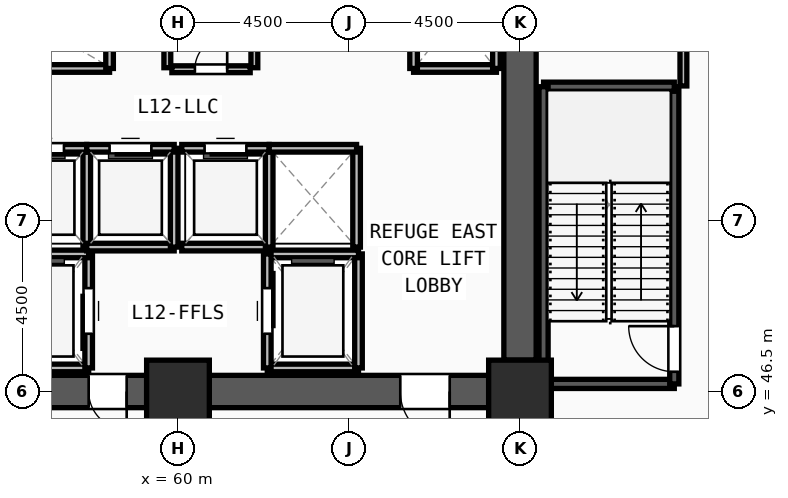
"""IFC4 building model, lengths in metres.
Left out: names, types, materials, properties, quantities, classifications, styles, units other than length and angle.
Written with IfcOpenShell. Run it as: python <this file> out.ifc"""

import sys

from ifc_helpers import new_model, si_unit, direction, frame, frame_2d, origin, origin_2d, place, context, subcontext, project, spatial, rectangle, extrude, source, transform, mapped, element, fill, save


model = new_model("IFC4")
c1 = context("Model", 3, precision=1e-05, world=origin(), true_north=direction((0.0, 1.0)))
c2 = subcontext(c1, "Body", "Model", "MODEL_VIEW")
j1 = project(units=[si_unit("LENGTHUNIT", "METRE"), si_unit("PLANEANGLEUNIT", "RADIAN")], contexts=[c1])
p1 = place(None, origin())
s1 = spatial("IfcSite", under=j1, at=p1, CompositionType="ELEMENT")
p2 = place(p1, origin())
s2 = spatial("IfcBuilding", under=s1, at=p2, CompositionType="ELEMENT")
p3 = place(p2, frame((0.0, 0.0, 47.25)))
s3 = spatial("IfcBuildingStorey", under=s2, at=p3, CompositionType="ELEMENT", Elevation=47.25)
m1 = source(origin(), c2, "Body", "SweptSolid", [
    extrude(rectangle(XDim=1.65, YDim=1.65, at=origin_2d()), origin(), (0.0, 0.0, 1.0), 4.5),
])
for number, where, z_axis, x_axis in (
    (1, (60.0, 46.5, 0.0), (0.0, 0.0, 1.0), (1.0, 0.0, 0.0)),
    (2, (69.0, 46.5, 0.0), (0.0, 0.0, 1.0), (1.0, 0.0, 0.0)),
):
    element("IfcColumn", number, at=place(p3, frame(where, z_axis=z_axis, x_axis=x_axis)), inside=s3, PredefinedType="COLUMN", context=c2, shape_type="MappedRepresentation", body=[
        mapped(m1, transform((0.0, 0.0, 0.0), x_axis=(1.0, 0.0, 0.0), y_axis=(0.0, 1.0, 0.0), z_axis=(0.0, 0.0, 1.0), scale=1.0)),
    ])
p4 = place(p3, frame((69.0, 60.675, 0.0), z_axis=(0.0, 0.0, 1.0), x_axis=(0.0, -1.0, 0.0)))
e3 = element("IfcWall", 3, at=p4, inside=s3, PredefinedType="SHEAR", context=c2, shape_type="SweptSolid", body=[
    extrude(rectangle(XDim=13.35, YDim=0.85, at=frame_2d((6.675, 0.0))), origin(), (0.0, 0.0, 1.0), 4.32),
])
m2 = source(origin(), c2, "Body", "SweptSolid", [
    extrude(rectangle(XDim=1.2, YDim=2.2, at=frame_2d((0.6, 1.1))), frame((0.0, 0.435, 0.0), z_axis=(0.0, -1.0, 0.0), x_axis=(1.0, 0.0, 0.0)), (0.0, 0.0, 1.0), 0.87),
])
p5 = place(p4, frame((1.125, 0.0, 0.0)))
e4 = element("IfcOpeningElement", 4, at=p5, cuts=e3, PredefinedType="OPENING", context=c2, shape_type="MappedRepresentation", body=[
    mapped(m2, transform((0.0, 0.0, 0.0), x_axis=(1.0, 0.0, 0.0), y_axis=(0.0, 1.0, 0.0), z_axis=(0.0, 0.0, 1.0), scale=1.0)),
])
p6 = place(p3, frame((68.175, 46.5, 0.0), z_axis=(0.0, 0.0, 1.0), x_axis=(-1.0, 0.0, 0.0)))
e5 = element("IfcWall", 5, at=p6, inside=s3, PredefinedType="SHEAR", context=c2, shape_type="SweptSolid", body=[
    extrude(rectangle(XDim=7.35, YDim=0.85, at=frame_2d((3.675, 0.0))), origin(), (0.0, 0.0, 1.0), 4.32),
])
m3 = source(origin(), c2, "Body", "SweptSolid", [
    extrude(rectangle(XDim=1.3, YDim=2.2, at=frame_2d((0.65, 1.1))), frame((0.0, 0.435, 0.0), z_axis=(0.0, -1.0, 0.0), x_axis=(1.0, 0.0, 0.0)), (0.0, 0.0, 1.0), 0.87),
])
p7 = place(p6, frame((1.025, 0.0, 0.0)))
e6 = element("IfcOpeningElement", 6, at=p7, cuts=e5, PredefinedType="OPENING", context=c2, shape_type="MappedRepresentation", body=[
    mapped(m3, transform((0.0, 0.0, 0.0), x_axis=(1.0, 0.0, 0.0), y_axis=(0.0, 1.0, 0.0), z_axis=(0.0, 0.0, 1.0), scale=1.0)),
])
p8 = place(p3, frame((59.175, 46.5, 0.0), z_axis=(0.0, 0.0, 1.0), x_axis=(-1.0, 0.0, 0.0)))
e7 = element("IfcWall", 7, at=p8, inside=s3, PredefinedType="SHEAR", context=c2, shape_type="SweptSolid", body=[
    extrude(rectangle(XDim=7.35, YDim=0.85, at=frame_2d((3.675, 0.0))), origin(), (0.0, 0.0, 1.0), 4.32),
])
p9 = place(p8, frame((5.025, 0.0, 0.0)))
e8 = element("IfcOpeningElement", 8, at=p9, cuts=e7, PredefinedType="OPENING", context=c2, shape_type="MappedRepresentation", body=[
    mapped(m3, transform((0.0, 0.0, 0.0), x_axis=(1.0, 0.0, 0.0), y_axis=(0.0, 1.0, 0.0), z_axis=(0.0, 0.0, 1.0), scale=1.0)),
])
m4 = source(origin(), c2, "Body", "SweptSolid", [
    extrude(rectangle(XDim=1.0, YDim=2.2, at=frame_2d((0.5, 1.1))), frame((0.0, 0.435, 0.0), z_axis=(0.0, -1.0, 0.0), x_axis=(1.0, 0.0, 0.0)), (0.0, 0.0, 1.0), 0.87),
])
p10 = place(p8, frame((0.525, 0.0, 0.0)))
e9 = element("IfcOpeningElement", 9, at=p10, cuts=e7, PredefinedType="OPENING", context=c2, shape_type="MappedRepresentation", body=[
    mapped(m4, transform((0.0, 0.0, 0.0), x_axis=(1.0, 0.0, 0.0), y_axis=(0.0, 1.0, 0.0), z_axis=(0.0, 0.0, 1.0), scale=1.0)),
])
p11 = place(p3, frame((69.62, 46.7, 0.0), z_axis=(0.0, 0.0, 1.0), x_axis=(1.0, 0.0, 0.0)))
e10 = element("IfcWall", 10, at=p11, inside=s3, PredefinedType="SOLIDWALL", context=c2, shape_type="SweptSolid", body=[
    extrude(rectangle(XDim=3.44, YDim=0.24, at=frame_2d((1.72, 0.0))), origin(), (0.0, 0.0, 1.0), 4.32),
])
p12 = place(p3, frame((73.06, 46.7, 0.0), z_axis=(0.0, 0.0, 1.0), x_axis=(0.0, 1.0, 0.0)))
e11 = element("IfcWall", 11, at=p12, inside=s3, PredefinedType="SOLIDWALL", context=c2, shape_type="SweptSolid", body=[
    extrude(rectangle(XDim=7.82, YDim=0.24, at=frame_2d((3.91, 0.0))), origin(), (0.0, 0.0, 1.0), 4.32),
])
m5 = source(origin(), c2, "Body", "SweptSolid", [
    extrude(rectangle(XDim=1.2, YDim=2.2, at=frame_2d((0.6, 1.1))), frame((0.0, 0.13, 0.0), z_axis=(0.0, -1.0, 0.0), x_axis=(1.0, 0.0, 0.0)), (0.0, 0.0, 1.0), 0.26),
])
p13 = place(p12, frame((0.32, 0.0, 0.0)))
e12 = element("IfcOpeningElement", 12, at=p13, cuts=e11, PredefinedType="OPENING", context=c2, shape_type="MappedRepresentation", body=[
    mapped(m5, transform((0.0, 0.0, 0.0), x_axis=(1.0, 0.0, 0.0), y_axis=(0.0, 1.0, 0.0), z_axis=(0.0, 0.0, 1.0), scale=1.0)),
])
p14 = place(p3, frame((73.06, 54.52, 0.0), z_axis=(0.0, 0.0, 1.0), x_axis=(-1.0, 0.0, 0.0)))
e13 = element("IfcWall", 13, at=p14, inside=s3, PredefinedType="SOLIDWALL", context=c2, shape_type="SweptSolid", body=[
    extrude(rectangle(XDim=3.44, YDim=0.24, at=frame_2d((1.72, 0.0))), origin(), (0.0, 0.0, 1.0), 4.32),
])
p15 = place(p3, frame((69.62, 54.52, 0.0), z_axis=(0.0, 0.0, 1.0), x_axis=(0.0, -1.0, 0.0)))
e14 = element("IfcWall", 14, at=p15, inside=s3, PredefinedType="SOLIDWALL", context=c2, shape_type="SweptSolid", body=[
    extrude(rectangle(XDim=7.82, YDim=0.24, at=frame_2d((3.91, 0.0))), origin(), (0.0, 0.0, 1.0), 4.32),
])
p16 = place(p3, frame((55.25, 47.12, 0.0), z_axis=(0.0, 0.0, 1.0), x_axis=(1.0, 0.0, 0.0)))
e15 = element("IfcWall", 15, at=p16, inside=s3, PredefinedType="SOLIDWALL", context=c2, shape_type="SweptSolid", body=[
    extrude(rectangle(XDim=2.4, YDim=0.2, at=frame_2d((1.2, 0.0))), origin(), (0.0, 0.0, 1.0), 4.32),
])
p17 = place(p3, frame((57.65, 47.12, 0.0), z_axis=(0.0, 0.0, 1.0), x_axis=(0.0, 1.0, 0.0)))
e16 = element("IfcWall", 16, at=p17, inside=s3, PredefinedType="SOLIDWALL", context=c2, shape_type="SweptSolid", body=[
    extrude(rectangle(XDim=3.0, YDim=0.2, at=frame_2d((1.5, 0.0))), origin(), (0.0, 0.0, 1.0), 4.32),
])
m6 = source(origin(), c2, "Body", "SweptSolid", [
    extrude(rectangle(XDim=1.2, YDim=2.3, at=frame_2d((0.6, 1.15))), frame((0.0, 0.11, 0.0), z_axis=(0.0, -1.0, 0.0), x_axis=(1.0, 0.0, 0.0)), (0.0, 0.0, 1.0), 0.22),
])
p18 = place(p17, frame((0.9, 0.0, 0.0)))
e17 = element("IfcOpeningElement", 17, at=p18, cuts=e16, PredefinedType="OPENING", context=c2, shape_type="MappedRepresentation", body=[
    mapped(m6, transform((0.0, 0.0, 0.0), x_axis=(1.0, 0.0, 0.0), y_axis=(0.0, 1.0, 0.0), z_axis=(0.0, 0.0, 1.0), scale=1.0)),
])
for number, where, z_axis, x_axis in (
    (18, (57.65, 50.12, 0.0), (0.0, 0.0, 1.0), (-1.0, 0.0, 0.0)),
    (19, (62.35, 47.12, 0.0), (0.0, 0.0, 1.0), (1.0, 0.0, 0.0)),
):
    element("IfcWall", number, at=place(p3, frame(where, z_axis=z_axis, x_axis=x_axis)), inside=s3, PredefinedType="SOLIDWALL", context=c2, shape_type="SweptSolid", body=[
        extrude(rectangle(XDim=2.4, YDim=0.2, at=frame_2d((1.2, 0.0))), origin(), (0.0, 0.0, 1.0), 4.32),
    ])
p19 = place(p3, frame((64.75, 47.12, 0.0), z_axis=(0.0, 0.0, 1.0), x_axis=(0.0, 1.0, 0.0)))
e20 = element("IfcWall", 20, at=p19, inside=s3, PredefinedType="SOLIDWALL", context=c2, shape_type="SweptSolid", body=[
    extrude(rectangle(XDim=3.0, YDim=0.2, at=frame_2d((1.5, 0.0))), origin(), (0.0, 0.0, 1.0), 4.32),
])
p20 = place(p3, frame((64.75, 50.12, 0.0), z_axis=(0.0, 0.0, 1.0), x_axis=(-1.0, 0.0, 0.0)))
e21 = element("IfcWall", 21, at=p20, inside=s3, PredefinedType="SOLIDWALL", context=c2, shape_type="SweptSolid", body=[
    extrude(rectangle(XDim=2.4, YDim=0.2, at=frame_2d((1.2, 0.0))), origin(), (0.0, 0.0, 1.0), 4.32),
])
p21 = place(p3, frame((62.35, 50.12, 0.0), z_axis=(0.0, 0.0, 1.0), x_axis=(0.0, -1.0, 0.0)))
e22 = element("IfcWall", 22, at=p21, inside=s3, PredefinedType="SOLIDWALL", context=c2, shape_type="SweptSolid", body=[
    extrude(rectangle(XDim=3.0, YDim=0.2, at=frame_2d((1.5, 0.0))), origin(), (0.0, 0.0, 1.0), 4.32),
])
p22 = place(p21, frame((0.9, 0.0, 0.0)))
e23 = element("IfcOpeningElement", 23, at=p22, cuts=e22, PredefinedType="OPENING", context=c2, shape_type="MappedRepresentation", body=[
    mapped(m6, transform((0.0, 0.0, 0.0), x_axis=(1.0, 0.0, 0.0), y_axis=(0.0, 1.0, 0.0), z_axis=(0.0, 0.0, 1.0), scale=1.0)),
])
p23 = place(p3, frame((66.2, 55.0, 0.0), z_axis=(0.0, 0.0, 1.0), x_axis=(1.0, 0.0, 0.0)))
e24 = element("IfcWall", 24, at=p23, inside=s3, PredefinedType="SOLIDWALL", context=c2, shape_type="SweptSolid", body=[
    extrude(rectangle(XDim=2.18, YDim=0.2, at=frame_2d((1.09, 0.0))), origin(), (0.0, 0.0, 1.0), 4.32),
])
for number, where, z_axis, x_axis in (
    (25, (68.38, 55.0, 0.0), (0.0, 0.0, 1.0), (0.0, 1.0, 0.0)),
    (26, (66.2, 57.75, 0.0), (0.0, 0.0, 1.0), (0.0, -1.0, 0.0)),
):
    element("IfcWall", number, at=place(p3, frame(where, z_axis=z_axis, x_axis=x_axis)), inside=s3, PredefinedType="SOLIDWALL", context=c2, shape_type="SweptSolid", body=[
        extrude(rectangle(XDim=2.75, YDim=0.2, at=frame_2d((1.375, 0.0))), origin(), (0.0, 0.0, 1.0), 4.32),
    ])
p24 = place(p3, frame((57.6, 50.3, 0.0), z_axis=(0.0, 0.0, 1.0), x_axis=(0.0, 1.0, 0.0)))
e27 = element("IfcWall", 27, at=p24, inside=s3, PredefinedType="SOLIDWALL", context=c2, shape_type="SweptSolid", body=[
    extrude(rectangle(XDim=2.6, YDim=0.2, at=frame_2d((1.3, 0.0))), origin(), (0.0, 0.0, 1.0), 4.32),
])
p25 = place(p3, frame((57.6, 52.9, 0.0), z_axis=(0.0, 0.0, 1.0), x_axis=(-1.0, 0.0, 0.0)))
e28 = element("IfcWall", 28, at=p25, inside=s3, PredefinedType="SOLIDWALL", context=c2, shape_type="SweptSolid", body=[
    extrude(rectangle(XDim=2.3, YDim=0.2, at=frame_2d((1.15, 0.0))), origin(), (0.0, 0.0, 1.0), 4.32),
])
m7 = source(origin(), c2, "Body", "SweptSolid", [
    extrude(rectangle(XDim=1.1, YDim=2.2, at=frame_2d((0.55, 1.1))), frame((0.0, 0.11, 0.0), z_axis=(0.0, -1.0, 0.0), x_axis=(1.0, 0.0, 0.0)), (0.0, 0.0, 1.0), 0.22),
])
p26 = place(p25, frame((0.6, 0.0, 0.0)))
e29 = element("IfcOpeningElement", 29, at=p26, cuts=e28, PredefinedType="OPENING", context=c2, shape_type="MappedRepresentation", body=[
    mapped(m7, transform((0.0, 0.0, 0.0), x_axis=(1.0, 0.0, 0.0), y_axis=(0.0, 1.0, 0.0), z_axis=(0.0, 0.0, 1.0), scale=1.0)),
])
p27 = place(p3, frame((57.6, 50.3, 0.0), z_axis=(0.0, 0.0, 1.0), x_axis=(1.0, 0.0, 0.0)))
e30 = element("IfcWall", 30, at=p27, inside=s3, PredefinedType="SOLIDWALL", context=c2, shape_type="SweptSolid", body=[
    extrude(rectangle(XDim=2.3, YDim=0.2, at=frame_2d((1.15, 0.0))), origin(), (0.0, 0.0, 1.0), 4.32),
])
p28 = place(p3, frame((59.9, 50.3, 0.0), z_axis=(0.0, 0.0, 1.0), x_axis=(0.0, 1.0, 0.0)))
e31 = element("IfcWall", 31, at=p28, inside=s3, PredefinedType="SOLIDWALL", context=c2, shape_type="SweptSolid", body=[
    extrude(rectangle(XDim=2.6, YDim=0.2, at=frame_2d((1.3, 0.0))), origin(), (0.0, 0.0, 1.0), 4.32),
])
p29 = place(p3, frame((59.9, 52.9, 0.0), z_axis=(0.0, 0.0, 1.0), x_axis=(-1.0, 0.0, 0.0)))
e32 = element("IfcWall", 32, at=p29, inside=s3, PredefinedType="SOLIDWALL", context=c2, shape_type="SweptSolid", body=[
    extrude(rectangle(XDim=2.3, YDim=0.2, at=frame_2d((1.15, 0.0))), origin(), (0.0, 0.0, 1.0), 4.32),
])
p30 = place(p29, frame((0.6, 0.0, 0.0)))
e33 = element("IfcOpeningElement", 33, at=p30, cuts=e32, PredefinedType="OPENING", context=c2, shape_type="MappedRepresentation", body=[
    mapped(m7, transform((0.0, 0.0, 0.0), x_axis=(1.0, 0.0, 0.0), y_axis=(0.0, 1.0, 0.0), z_axis=(0.0, 0.0, 1.0), scale=1.0)),
])
p31 = place(p3, frame((60.1, 50.3, 0.0), z_axis=(0.0, 0.0, 1.0), x_axis=(1.0, 0.0, 0.0)))
e34 = element("IfcWall", 34, at=p31, inside=s3, PredefinedType="SOLIDWALL", context=c2, shape_type="SweptSolid", body=[
    extrude(rectangle(XDim=2.3, YDim=0.2, at=frame_2d((1.15, 0.0))), origin(), (0.0, 0.0, 1.0), 4.32),
])
p32 = place(p3, frame((62.4, 50.3, 0.0), z_axis=(0.0, 0.0, 1.0), x_axis=(0.0, 1.0, 0.0)))
e35 = element("IfcWall", 35, at=p32, inside=s3, PredefinedType="SOLIDWALL", context=c2, shape_type="SweptSolid", body=[
    extrude(rectangle(XDim=2.6, YDim=0.2, at=frame_2d((1.3, 0.0))), origin(), (0.0, 0.0, 1.0), 4.32),
])
p33 = place(p3, frame((62.4, 52.9, 0.0), z_axis=(0.0, 0.0, 1.0), x_axis=(-1.0, 0.0, 0.0)))
e36 = element("IfcWall", 36, at=p33, inside=s3, PredefinedType="SOLIDWALL", context=c2, shape_type="SweptSolid", body=[
    extrude(rectangle(XDim=2.3, YDim=0.2, at=frame_2d((1.15, 0.0))), origin(), (0.0, 0.0, 1.0), 4.32),
])
p34 = place(p33, frame((0.6, 0.0, 0.0)))
e37 = element("IfcOpeningElement", 37, at=p34, cuts=e36, PredefinedType="OPENING", context=c2, shape_type="MappedRepresentation", body=[
    mapped(m7, transform((0.0, 0.0, 0.0), x_axis=(1.0, 0.0, 0.0), y_axis=(0.0, 1.0, 0.0), z_axis=(0.0, 0.0, 1.0), scale=1.0)),
])
p35 = place(p3, frame((64.7, 50.3, 0.0), z_axis=(0.0, 0.0, 1.0), x_axis=(0.0, 1.0, 0.0)))
e38 = element("IfcWall", 38, at=p35, inside=s3, PredefinedType="SOLIDWALL", context=c2, shape_type="SweptSolid", body=[
    extrude(rectangle(XDim=2.6, YDim=0.2, at=frame_2d((1.3, 0.0))), origin(), (0.0, 0.0, 1.0), 4.32),
])
p36 = place(p3, frame((64.7, 52.9, 0.0), z_axis=(0.0, 0.0, 1.0), x_axis=(-1.0, 0.0, 0.0)))
e39 = element("IfcWall", 39, at=p36, inside=s3, PredefinedType="SOLIDWALL", context=c2, shape_type="SweptSolid", body=[
    extrude(rectangle(XDim=2.3, YDim=0.2, at=frame_2d((1.15, 0.0))), origin(), (0.0, 0.0, 1.0), 4.32),
])
p37 = place(p3, frame((56.0, 55.0, 0.0), z_axis=(0.0, 0.0, 1.0), x_axis=(1.0, 0.0, 0.0)))
e40 = element("IfcWall", 40, at=p37, inside=s3, PredefinedType="SOLIDWALL", context=c2, shape_type="SweptSolid", body=[
    extrude(rectangle(XDim=2.2, YDim=0.2, at=frame_2d((1.1, 0.0))), origin(), (0.0, 0.0, 1.0), 4.32),
])
p38 = place(p3, frame((58.2, 55.0, 0.0), z_axis=(0.0, 0.0, 1.0), x_axis=(0.0, 1.0, 0.0)))
e41 = element("IfcWall", 41, at=p38, inside=s3, PredefinedType="SOLIDWALL", context=c2, shape_type="SweptSolid", body=[
    extrude(rectangle(XDim=2.6, YDim=0.2, at=frame_2d((1.3, 0.0))), origin(), (0.0, 0.0, 1.0), 4.32),
])
p39 = place(p3, frame((59.84, 54.98, 0.0), z_axis=(0.0, 0.0, 1.0), x_axis=(1.0, 0.0, 0.0)))
e42 = element("IfcWall", 42, at=p39, inside=s3, PredefinedType="PARTITIONING", context=c2, shape_type="SweptSolid", body=[
    extrude(rectangle(XDim=2.06, YDim=0.18, at=frame_2d((1.03, 0.0))), origin(), (0.0, 0.0, 1.0), 4.32),
])
m8 = source(origin(), c2, "Body", "SweptSolid", [
    extrude(rectangle(XDim=0.85, YDim=2.1, at=frame_2d((0.425, 1.05))), frame((0.0, 0.1, 0.0), z_axis=(0.0, -1.0, 0.0), x_axis=(1.0, 0.0, 0.0)), (0.0, 0.0, 1.0), 0.2),
])
p40 = place(p39, frame((0.605, 0.0, 0.0)))
e43 = element("IfcOpeningElement", 43, at=p40, cuts=e42, PredefinedType="OPENING", context=c2, shape_type="MappedRepresentation", body=[
    mapped(m8, transform((0.0, 0.0, 0.0), x_axis=(1.0, 0.0, 0.0), y_axis=(0.0, 1.0, 0.0), z_axis=(0.0, 0.0, 1.0), scale=1.0)),
])
p41 = place(p3, frame((73.3, 54.54, 0.0), z_axis=(0.0, 0.0, 1.0), x_axis=(0.0, 1.0, 0.0)))
e44 = element("IfcWall", 44, at=p41, inside=s3, PredefinedType="PARTITIONING", context=c2, shape_type="SweptSolid", body=[
    extrude(rectangle(XDim=5.52, YDim=0.18, at=frame_2d((2.76, 0.0))), origin(), (0.0, 0.0, 1.0), 4.32),
])
m9 = source(origin(), c2, "Body", "SweptSolid", [
    extrude(rectangle(XDim=1.3, YDim=2.2, at=frame_2d((0.65, 1.1))), frame((0.0, 0.1, 0.0), z_axis=(0.0, -1.0, 0.0), x_axis=(1.0, 0.0, 0.0)), (0.0, 0.0, 1.0), 0.2),
])
p42 = place(p41, frame((2.11, 0.0, 0.0)))
e45 = element("IfcOpeningElement", 45, at=p42, cuts=e44, PredefinedType="OPENING", context=c2, shape_type="MappedRepresentation", body=[
    mapped(m9, transform((0.0, 0.0, 0.0), x_axis=(1.0, 0.0, 0.0), y_axis=(0.0, 1.0, 0.0), z_axis=(0.0, 0.0, 1.0), scale=1.0)),
])
for number, where, z_axis, x_axis in (
    (46, (59.72, 55.02, 0.0), (0.0, 0.0, 1.0), (0.0, 1.0, 0.0)),
    (47, (62.01, 55.02, 0.0), (0.0, 0.0, 1.0), (0.0, 1.0, 0.0)),
):
    element("IfcWall", number, at=place(p3, frame(where, z_axis=z_axis, x_axis=x_axis)), inside=s3, PredefinedType="PARTITIONING", context=c2, shape_type="SweptSolid", body=[
        extrude(rectangle(XDim=2.88, YDim=0.18, at=frame_2d((1.44, 0.0))), origin(), (0.0, 0.0, 1.0), 4.32),
    ])
m10 = source(origin(), c2, "Body", "SweptSolid", [
    extrude(rectangle(XDim=1.0, YDim=2.2, at=frame_2d((0.5, 1.1))), frame((0.0, 0.025, 0.0), z_axis=(0.0, -1.0, 0.0), x_axis=(1.0, 0.0, 0.0)), (0.0, 0.0, 1.0), 0.05),
])
p43 = place(p10, origin())
e48 = element("IfcDoor", 48, at=p43, inside=s3, OperationType="SINGLE_SWING_LEFT", PredefinedType="DOOR", context=c2, shape_type="MappedRepresentation", body=[
    mapped(m10, transform((0.0, 0.0, 0.0), x_axis=(1.0, 0.0, 0.0), y_axis=(0.0, 1.0, 0.0), z_axis=(0.0, 0.0, 1.0), scale=1.0)),
])
fill(e9, e48)
m11 = source(origin(), c2, "Body", "SweptSolid", [
    extrude(rectangle(XDim=1.3, YDim=2.2, at=frame_2d((0.65, 1.1))), frame((0.0, 0.025, 0.0), z_axis=(0.0, -1.0, 0.0), x_axis=(1.0, 0.0, 0.0)), (0.0, 0.0, 1.0), 0.05),
])
p44 = place(p7, origin())
e49 = element("IfcDoor", 49, at=p44, inside=s3, OperationType="SINGLE_SWING_LEFT", PredefinedType="DOOR", context=c2, shape_type="MappedRepresentation", body=[
    mapped(m11, transform((0.0, 0.0, 0.0), x_axis=(1.0, 0.0, 0.0), y_axis=(0.0, 1.0, 0.0), z_axis=(0.0, 0.0, 1.0), scale=1.0)),
])
fill(e6, e49)
m12 = source(origin(), c2, "Body", "SweptSolid", [
    extrude(rectangle(XDim=1.2, YDim=2.2, at=frame_2d((0.6, 1.1))), frame((0.0, 0.025, 0.0), z_axis=(0.0, -1.0, 0.0), x_axis=(1.0, 0.0, 0.0)), (0.0, 0.0, 1.0), 0.05),
])
p45 = place(p13, origin())
e50 = element("IfcDoor", 50, at=p45, inside=s3, OperationType="SINGLE_SWING_RIGHT", PredefinedType="DOOR", context=c2, shape_type="MappedRepresentation", body=[
    mapped(m12, transform((0.0, 0.0, 0.0), x_axis=(1.0, 0.0, 0.0), y_axis=(0.0, 1.0, 0.0), z_axis=(0.0, 0.0, 1.0), scale=1.0)),
])
fill(e12, e50)
m13 = source(origin(), c2, "Body", "SweptSolid", [
    extrude(rectangle(XDim=1.2, YDim=2.3, at=frame_2d((0.6, 1.15))), frame((0.0, 0.025, 0.0), z_axis=(0.0, -1.0, 0.0), x_axis=(1.0, 0.0, 0.0)), (0.0, 0.0, 1.0), 0.05),
])
p46 = place(p18, origin())
e51 = element("IfcDoor", 51, at=p46, inside=s3, OperationType="SLIDING_TO_LEFT", PredefinedType="DOOR", context=c2, shape_type="MappedRepresentation", body=[
    mapped(m13, transform((0.0, 0.0, 0.0), x_axis=(1.0, 0.0, 0.0), y_axis=(0.0, 1.0, 0.0), z_axis=(0.0, 0.0, 1.0), scale=1.0)),
])
fill(e17, e51)
p47 = place(p22, origin())
e52 = element("IfcDoor", 52, at=p47, inside=s3, OperationType="SLIDING_TO_LEFT", PredefinedType="DOOR", context=c2, shape_type="MappedRepresentation", body=[
    mapped(m13, transform((0.0, 0.0, 0.0), x_axis=(1.0, 0.0, 0.0), y_axis=(0.0, 1.0, 0.0), z_axis=(0.0, 0.0, 1.0), scale=1.0)),
])
fill(e23, e52)
m14 = source(origin(), c2, "Body", "SweptSolid", [
    extrude(rectangle(XDim=1.1, YDim=2.2, at=frame_2d((0.55, 1.1))), frame((0.0, 0.025, 0.0), z_axis=(0.0, -1.0, 0.0), x_axis=(1.0, 0.0, 0.0)), (0.0, 0.0, 1.0), 0.05),
])
p48 = place(p26, origin())
e53 = element("IfcDoor", 53, at=p48, inside=s3, OperationType="SLIDING_TO_LEFT", PredefinedType="DOOR", context=c2, shape_type="MappedRepresentation", body=[
    mapped(m14, transform((0.0, 0.0, 0.0), x_axis=(1.0, 0.0, 0.0), y_axis=(0.0, 1.0, 0.0), z_axis=(0.0, 0.0, 1.0), scale=1.0)),
])
fill(e29, e53)
p49 = place(p30, origin())
e54 = element("IfcDoor", 54, at=p49, inside=s3, OperationType="SLIDING_TO_LEFT", PredefinedType="DOOR", context=c2, shape_type="MappedRepresentation", body=[
    mapped(m14, transform((0.0, 0.0, 0.0), x_axis=(1.0, 0.0, 0.0), y_axis=(0.0, 1.0, 0.0), z_axis=(0.0, 0.0, 1.0), scale=1.0)),
])
fill(e33, e54)
p50 = place(p34, origin())
e55 = element("IfcDoor", 55, at=p50, inside=s3, OperationType="SLIDING_TO_LEFT", PredefinedType="DOOR", context=c2, shape_type="MappedRepresentation", body=[
    mapped(m14, transform((0.0, 0.0, 0.0), x_axis=(1.0, 0.0, 0.0), y_axis=(0.0, 1.0, 0.0), z_axis=(0.0, 0.0, 1.0), scale=1.0)),
])
fill(e37, e55)
m15 = source(origin(), c2, "Body", "SweptSolid", [
    extrude(rectangle(XDim=0.85, YDim=2.1, at=frame_2d((0.425, 1.05))), frame((0.0, 0.025, 0.0), z_axis=(0.0, -1.0, 0.0), x_axis=(1.0, 0.0, 0.0)), (0.0, 0.0, 1.0), 0.05),
])
p51 = place(p40, origin())
e56 = element("IfcDoor", 56, at=p51, inside=s3, OperationType="SINGLE_SWING_RIGHT", PredefinedType="DOOR", context=c2, shape_type="MappedRepresentation", body=[
    mapped(m15, transform((0.0, 0.0, 0.0), x_axis=(1.0, 0.0, 0.0), y_axis=(0.0, 1.0, 0.0), z_axis=(0.0, 0.0, 1.0), scale=1.0)),
])
fill(e43, e56)
save(model, sys.argv[1])
